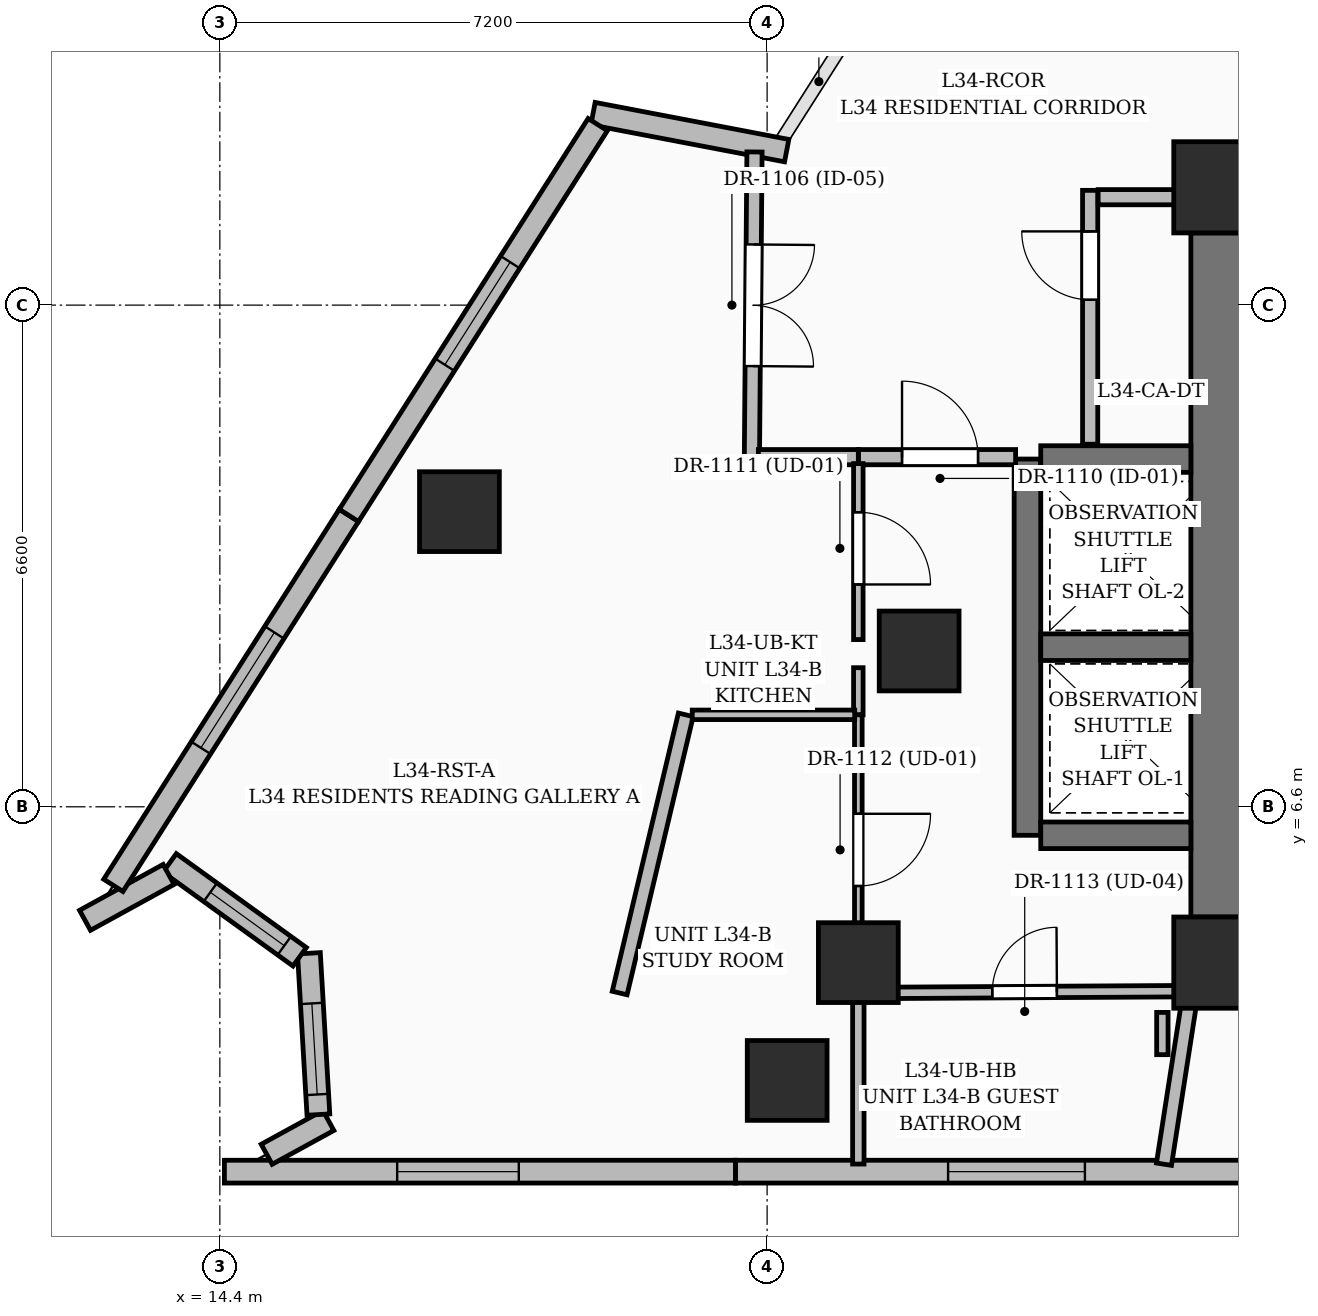
"""IFC4 building model, lengths in metres.
Left out: names, types, materials, properties, quantities, classifications, styles, units other than length and angle.
Written with IfcOpenShell. Run it as: python <this file> out.ifc"""

import sys

from ifc_helpers import new_model, si_unit, direction, frame, frame_2d, origin, origin_2d, place, context, subcontext, project, spatial, rectangle, extrude, element, fill, save


model = new_model("IFC4")
c1 = context("Model", 3, precision=1e-05, world=origin(), true_north=direction((0.0, 1.0)))
c2 = subcontext(c1, "Body", "Model", "MODEL_VIEW")
j1 = project(units=[si_unit("LENGTHUNIT", "METRE"), si_unit("PLANEANGLEUNIT", "RADIAN")], contexts=[c1])
p1 = place(None, origin())
s1 = spatial("IfcSite", under=j1, at=p1, CompositionType="ELEMENT")
p2 = place(p1, origin())
s2 = spatial("IfcBuilding", under=s1, at=p2, CompositionType="ELEMENT")
p3 = place(p2, frame((0.0, 0.0, 135.6)))
s3 = spatial("IfcBuildingStorey", under=s2, at=p3, CompositionType="ELEMENT", Elevation=135.6)
for number, where, z_axis, x_axis in (
    (1, (27.55, 4.55, 0.0), (0.0, 0.0, 1.0), (1.0, 0.0, 0.0)),
    (2, (27.55, 14.75, 0.0), (0.0, 0.0, 1.0), (1.0, 0.0, 0.0)),
):
    element("IfcColumn", number, at=place(p3, frame(where, z_axis=z_axis, x_axis=x_axis)), inside=s3, PredefinedType="COLUMN", context=c2, shape_type="SweptSolid", body=[
        extrude(rectangle(XDim=1.2, YDim=1.2, at=origin_2d()), origin(), (0.0, 0.0, 1.0), 3.6),
    ])
for number, where, z_axis, x_axis in (
    (3, (22.8, 4.55, 0.0), (0.0, 0.0, 1.0), (1.0, 0.0, 0.0)),
    (4, (23.6, 8.65, 0.0), (0.0, 0.0, 1.0), (1.0, 0.0, 0.0)),
):
    element("IfcColumn", number, at=place(p3, frame(where, z_axis=z_axis, x_axis=x_axis)), inside=s3, PredefinedType="COLUMN", context=c2, shape_type="SweptSolid", body=[
        extrude(rectangle(XDim=1.05, YDim=1.05, at=origin_2d()), origin(), (0.0, 0.0, 1.0), 3.6),
    ])
p4 = place(p3, frame((27.55, 5.15, 0.0), z_axis=(0.0, 0.0, 1.0), x_axis=(0.0, 1.0, 0.0)))
e5 = element("IfcWall", 5, at=p4, inside=s3, PredefinedType="SHEAR", context=c2, shape_type="SweptSolid", body=[
    extrude(rectangle(XDim=9.0, YDim=0.75, at=frame_2d((4.5, 0.0))), origin(), (0.0, 0.0, 1.0), 3.6),
])
p5 = place(p3, frame((25.025, 6.225, 0.0), z_axis=(0.0, 0.0, 1.0), x_axis=(0.0, 1.0, 0.0)))
e6 = element("IfcWall", 6, at=p5, inside=s3, PredefinedType="SOLIDWALL", context=c2, shape_type="SweptSolid", body=[
    extrude(rectangle(XDim=4.95, YDim=0.35, at=frame_2d((2.475, 0.0))), origin(), (0.0, 0.0, 1.0), 3.6),
])
for number, where, z_axis, x_axis in (
    (7, (25.2, 6.225, 0.0), (0.0, 0.0, 1.0), (1.0, 0.0, 0.0)),
    (8, (25.2, 8.7, 0.0), (0.0, 0.0, 1.0), (1.0, 0.0, 0.0)),
    (9, (25.2, 11.175, 0.0), (0.0, 0.0, 1.0), (1.0, 0.0, 0.0)),
):
    element("IfcWall", number, at=place(p3, frame(where, z_axis=z_axis, x_axis=x_axis)), inside=s3, PredefinedType="SOLIDWALL", context=c2, shape_type="SweptSolid", body=[
        extrude(rectangle(XDim=1.975, YDim=0.35, at=frame_2d((0.988, 0.0))), origin(), (0.0, 0.0, 1.0), 3.6),
    ])
for number, where, z_axis, x_axis in (
    (10, (21.864, 3.0, 0.0), (0.0, 0.0, 1.0), (1.0, 0.0, 0.0)),
    (11, (17.552, 10.483, 0.0), (0.0, 0.0, 1.0), (1.0, 0.0, 0.0)),
):
    element("IfcColumn", number, at=place(p3, frame(where, z_axis=z_axis, x_axis=x_axis)), inside=s3, PredefinedType="COLUMN", context=c2, shape_type="SweptSolid", body=[
        extrude(rectangle(XDim=1.05, YDim=1.05, at=origin_2d()), origin(), (0.0, 0.0, 1.0), 3.6),
    ])
p6 = place(p3, frame((19.31, 15.719, 0.0), z_axis=(0.0, 0.0, 1.0), x_axis=(0.982248657163, -0.187583516072, 0.0)))
e12 = element("IfcWall", 12, at=p6, inside=s3, PredefinedType="SOLIDWALL", context=c2, shape_type="SweptSolid", body=[
    extrude(rectangle(XDim=2.594, YDim=0.3, at=frame_2d((1.297, 0.0))), origin(), (0.0, 0.0, 1.0), 2.575),
])
p7 = place(p3, frame((27.906, 1.8, 0.0), z_axis=(0.0, 0.0, 1.0), x_axis=(-1.0, 0.0, 0.0)))
e13 = element("IfcWall", 13, at=p7, inside=s3, PredefinedType="SOLIDWALL", context=c2, shape_type="SweptSolid", body=[
    extrude(rectangle(XDim=6.723, YDim=0.3, at=frame_2d((3.361, 0.0))), origin(), (0.0, 0.0, 1.0), 3.35),
])
p8 = place(p7, frame((2.125, 0.0, 0.6)))
e14 = element("IfcOpeningElement", 14, at=p8, cuts=e13, PredefinedType="OPENING", context=c2, shape_type="SweptSolid", body=[
    extrude(rectangle(XDim=1.8, YDim=2.1, at=frame_2d((0.9, 1.05))), frame((0.0, 0.16, 0.0), z_axis=(0.0, -1.0, 0.0), x_axis=(1.0, 0.0, 0.0)), (0.0, 0.0, 1.0), 0.32),
])
p9 = place(p3, frame((21.183, 1.8, 0.0), z_axis=(0.0, 0.0, 1.0), x_axis=(-1.0, 0.0, 0.0)))
e15 = element("IfcWall", 15, at=p9, inside=s3, PredefinedType="SOLIDWALL", context=c2, shape_type="SweptSolid", body=[
    extrude(rectangle(XDim=6.723, YDim=0.3, at=frame_2d((3.362, 0.0))), origin(), (0.0, 0.0, 1.0), 3.35),
])
p10 = place(p9, frame((2.85, 0.0, 0.55)))
e16 = element("IfcOpeningElement", 16, at=p10, cuts=e15, PredefinedType="OPENING", context=c2, shape_type="SweptSolid", body=[
    extrude(rectangle(XDim=1.6, YDim=2.2, at=frame_2d((0.8, 1.1))), frame((0.0, 0.16, 0.0), z_axis=(0.0, -1.0, 0.0), x_axis=(1.0, 0.0, 0.0)), (0.0, 0.0, 1.0), 0.32),
])
p11 = place(p3, frame((15.016, 2.028, 0.0), z_axis=(0.0, 0.0, 1.0), x_axis=(0.876794471231, 0.48086531921, 0.0)))
e17 = element("IfcWall", 17, at=p11, inside=s3, PredefinedType="SOLIDWALL", context=c2, shape_type="SweptSolid", body=[
    extrude(rectangle(XDim=0.926, YDim=0.3, at=frame_2d((0.463, 0.0))), origin(), (0.0, 0.0, 1.0), 3.35),
])
p12 = place(p3, frame((15.697, 2.551, 0.0), z_axis=(0.0, 0.0, 1.0), x_axis=(-0.058688358982, 0.99827635278, 0.0)))
e18 = element("IfcWall", 18, at=p12, inside=s3, PredefinedType="SOLIDWALL", context=c2, shape_type="SweptSolid", body=[
    extrude(rectangle(XDim=2.126, YDim=0.3, at=frame_2d((1.063, 0.0))), origin(), (0.0, 0.0, 1.0), 3.35),
])
p13 = place(p12, frame((0.265, 0.0, 0.8)))
e19 = element("IfcOpeningElement", 19, at=p13, cuts=e18, PredefinedType="OPENING", context=c2, shape_type="SweptSolid", body=[
    extrude(rectangle(XDim=1.2, YDim=1.8, at=frame_2d((0.6, 0.9))), frame((0.0, 0.16, 0.0), z_axis=(0.0, -1.0, 0.0), x_axis=(1.0, 0.0, 0.0)), (0.0, 0.0, 1.0), 0.32),
])
p14 = place(p3, frame((15.45, 4.627, 0.0), z_axis=(0.0, 0.0, 1.0), x_axis=(-0.810712787228, 0.585444084969, 0.0)))
e20 = element("IfcWall", 20, at=p14, inside=s3, PredefinedType="SOLIDWALL", context=c2, shape_type="SweptSolid", body=[
    extrude(rectangle(XDim=2.11, YDim=0.3, at=frame_2d((1.055, 0.0))), origin(), (0.0, 0.0, 1.0), 3.35),
])
p15 = place(p14, frame((0.25, 0.0, 0.8)))
e21 = element("IfcOpeningElement", 21, at=p15, cuts=e20, PredefinedType="OPENING", context=c2, shape_type="SweptSolid", body=[
    extrude(rectangle(XDim=1.2, YDim=1.8, at=frame_2d((0.6, 0.9))), frame((0.0, 0.16, 0.0), z_axis=(0.0, -1.0, 0.0), x_axis=(1.0, 0.0, 0.0)), (0.0, 0.0, 1.0), 0.32),
])
p16 = place(p3, frame((13.726, 5.71, 0.0), z_axis=(0.0, 0.0, 1.0), x_axis=(-0.876642942611, -0.481141508467, 0.0)))
e22 = element("IfcWall", 22, at=p16, inside=s3, PredefinedType="SOLIDWALL", context=c2, shape_type="SweptSolid", body=[
    extrude(rectangle(XDim=1.254, YDim=0.3, at=frame_2d((0.627, 0.0))), origin(), (0.0, 0.0, 1.0), 3.35),
])
p17 = place(p3, frame((12.999, 5.566, 0.0), z_axis=(0.0, 0.0, 1.0), x_axis=(0.537080803341, 0.843530800079, 0.0)))
e23 = element("IfcWall", 23, at=p17, inside=s3, PredefinedType="SOLIDWALL", context=c2, shape_type="SweptSolid", body=[
    extrude(rectangle(XDim=5.77, YDim=0.3, at=frame_2d((2.885, 0.0))), origin(), (0.0, 0.0, 1.0), 3.35),
])
p18 = place(p17, frame((2.145, 0.0, 0.6)))
e24 = element("IfcOpeningElement", 24, at=p18, cuts=e23, PredefinedType="OPENING", context=c2, shape_type="SweptSolid", body=[
    extrude(rectangle(XDim=1.8, YDim=2.1, at=frame_2d((0.9, 1.05))), frame((0.0, 0.16, 0.0), z_axis=(0.0, -1.0, 0.0), x_axis=(1.0, 0.0, 0.0)), (0.0, 0.0, 1.0), 0.32),
])
p19 = place(p3, frame((16.098, 10.434, 0.0), z_axis=(0.0, 0.0, 1.0), x_axis=(0.537126867387, 0.843501469075, 0.0)))
e25 = element("IfcWall", 25, at=p19, inside=s3, PredefinedType="SOLIDWALL", context=c2, shape_type="SweptSolid", body=[
    extrude(rectangle(XDim=6.095, YDim=0.3, at=frame_2d((3.048, 0.0))), origin(), (0.0, 0.0, 1.0), 3.35),
])
p20 = place(p19, frame((2.35, 0.0, 0.55)))
e26 = element("IfcOpeningElement", 26, at=p20, cuts=e25, PredefinedType="OPENING", context=c2, shape_type="SweptSolid", body=[
    extrude(rectangle(XDim=1.6, YDim=2.2, at=frame_2d((0.8, 1.1))), frame((0.0, 0.16, 0.0), z_axis=(0.0, -1.0, 0.0), x_axis=(1.0, 0.0, 0.0)), (0.0, 0.0, 1.0), 0.32),
])
p21 = place(p3, frame((25.85, 11.37, 0.0), z_axis=(0.0, 0.0, 1.0), x_axis=(0.0, 1.0, 0.0)))
e27 = element("IfcWall", 27, at=p21, inside=s3, PredefinedType="PARTITIONING", context=c2, shape_type="SweptSolid", body=[
    extrude(rectangle(XDim=3.34, YDim=0.2, at=frame_2d((1.67, 0.0))), origin(), (0.0, 0.0, 1.0), 3.35),
])
p22 = place(p21, frame((1.9, 0.0, 0.0)))
e28 = element("IfcOpeningElement", 28, at=p22, cuts=e27, PredefinedType="OPENING", context=c2, shape_type="SweptSolid", body=[
    extrude(rectangle(XDim=0.9, YDim=2.1, at=frame_2d((0.45, 1.05))), frame((0.0, 0.11, 0.0), z_axis=(0.0, -1.0, 0.0), x_axis=(1.0, 0.0, 0.0)), (0.0, 0.0, 1.0), 0.22),
])
p23 = place(p3, frame((25.955, 14.62, 0.0), z_axis=(0.0, 0.0, 1.0), x_axis=(1.0, 0.0, 0.0)))
e29 = element("IfcWall", 29, at=p23, inside=s3, PredefinedType="PARTITIONING", context=c2, shape_type="SweptSolid", body=[
    extrude(rectangle(XDim=1.205, YDim=0.2, at=frame_2d((0.603, 0.0))), origin(), (0.0, 0.0, 1.0), 3.35),
])
p24 = place(p3, frame((21.434, 15.215, 0.0), z_axis=(0.0, 0.0, 1.0), x_axis=(-0.008512399832, -0.999963768868, 0.0)))
e30 = element("IfcWall", 30, at=p24, inside=s3, PredefinedType="PARTITIONING", context=c2, shape_type="SweptSolid", body=[
    extrude(rectangle(XDim=4.015, YDim=0.2, at=frame_2d((2.008, 0.0))), origin(), (0.0, 0.0, 1.0), 2.709),
])
p25 = place(p24, frame((1.217, 0.0, 0.0)))
e31 = element("IfcOpeningElement", 31, at=p25, cuts=e30, PredefinedType="OPENING", context=c2, shape_type="SweptSolid", body=[
    extrude(rectangle(XDim=1.6, YDim=2.3, at=frame_2d((0.8, 1.15))), frame((0.0, 0.11, 0.0), z_axis=(0.0, -1.0, 0.0), x_axis=(1.0, 0.0, 0.0)), (0.0, 0.0, 1.0), 0.22),
])
p26 = place(p3, frame((22.8, 11.2, 0.0), z_axis=(0.0, 0.0, 1.0), x_axis=(1.0, 0.0, 0.0)))
e32 = element("IfcWall", 32, at=p26, inside=s3, PredefinedType="PARTITIONING", context=c2, shape_type="SweptSolid", body=[
    extrude(rectangle(XDim=2.069, YDim=0.2, at=frame_2d((1.035, 0.0))), origin(), (0.0, 0.0, 1.0), 3.35),
])
p27 = place(p26, frame((0.575, 0.0, 0.0)))
e33 = element("IfcOpeningElement", 33, at=p27, cuts=e32, PredefinedType="OPENING", context=c2, shape_type="SweptSolid", body=[
    extrude(rectangle(XDim=1.0, YDim=2.2, at=frame_2d((0.5, 1.1))), frame((0.0, 0.11, 0.0), z_axis=(0.0, -1.0, 0.0), x_axis=(1.0, 0.0, 0.0)), (0.0, 0.0, 1.0), 0.22),
])
p28 = place(p3, frame((21.485, 11.2, 0.0), z_axis=(0.0, 0.0, 1.0), x_axis=(1.0, 0.0, 0.0)))
e34 = element("IfcWall", 34, at=p28, inside=s3, PredefinedType="PARTITIONING", context=c2, shape_type="SweptSolid", body=[
    extrude(rectangle(XDim=1.315, YDim=0.2, at=frame_2d((0.657, 0.0))), origin(), (0.0, 0.0, 1.0), 2.709),
])
p29 = place(p3, frame((19.66, 4.15, 0.0), z_axis=(0.0, 0.0, 1.0), x_axis=(0.231281283295, 0.972886924569, 0.0)))
e35 = element("IfcWall", 35, at=p29, inside=s3, PredefinedType="PARTITIONING", context=c2, shape_type="SweptSolid", body=[
    extrude(rectangle(XDim=3.762, YDim=0.2, at=frame_2d((1.881, 0.0))), origin(), (0.0, 0.0, 1.0), 2.57),
])
p30 = place(p3, frame((22.8, 4.15, 0.0), z_axis=(0.0, 0.0, 1.0), x_axis=(0.999983481992, 0.005747672915, 0.0)))
e36 = element("IfcWall", 36, at=p30, inside=s3, PredefinedType="PARTITIONING", context=c2, shape_type="SweptSolid", body=[
    extrude(rectangle(XDim=4.375, YDim=0.15, at=frame_2d((2.188, 0.0))), origin(), (0.0, 0.0, 1.0), 3.35),
])
p31 = place(p30, frame((1.762, 0.0, 0.0)))
e37 = element("IfcOpeningElement", 37, at=p31, cuts=e36, PredefinedType="OPENING", context=c2, shape_type="SweptSolid", body=[
    extrude(rectangle(XDim=0.85, YDim=2.1, at=frame_2d((0.425, 1.05))), frame((0.0, 0.085, 0.0), z_axis=(0.0, -1.0, 0.0), x_axis=(1.0, 0.0, 0.0)), (0.0, 0.0, 1.0), 0.17),
])
p32 = place(p3, frame((22.8, 8.43, 0.0), z_axis=(0.0, 0.0, 1.0), x_axis=(0.0, -1.0, 0.0)))
e38 = element("IfcWall", 38, at=p32, inside=s3, PredefinedType="PARTITIONING", context=c2, shape_type="SweptSolid", body=[
    extrude(rectangle(XDim=0.62, YDim=0.125, at=frame_2d((0.31, 0.0))), origin(), (0.0, 0.0, 1.0), 3.35),
])
p33 = place(p3, frame((22.8, 11.115, 0.0), z_axis=(0.0, 0.0, 1.0), x_axis=(0.0, -1.0, 0.0)))
e39 = element("IfcWall", 39, at=p33, inside=s3, PredefinedType="PARTITIONING", context=c2, shape_type="SweptSolid", body=[
    extrude(rectangle(XDim=2.315, YDim=0.125, at=frame_2d((1.157, 0.0))), origin(), (0.0, 0.0, 1.0), 2.372),
])
p34 = place(p33, frame((0.64, 0.0, 0.0)))
e40 = element("IfcOpeningElement", 40, at=p34, cuts=e39, PredefinedType="OPENING", context=c2, shape_type="SweptSolid", body=[
    extrude(rectangle(XDim=0.95, YDim=2.2, at=frame_2d((0.475, 1.1))), frame((0.0, 0.072, 0.0), z_axis=(0.0, -1.0, 0.0), x_axis=(1.0, 0.0, 0.0)), (0.0, 0.0, 1.0), 0.145),
])
p35 = place(p3, frame((22.8, 7.81, 0.0), z_axis=(0.0, 0.0, 1.0), x_axis=(0.0, -1.0, 0.0)))
e41 = element("IfcWall", 41, at=p35, inside=s3, PredefinedType="PARTITIONING", context=c2, shape_type="SweptSolid", body=[
    extrude(rectangle(XDim=3.62, YDim=0.1, at=frame_2d((1.81, 0.0))), origin(), (0.0, 0.0, 1.0), 3.35),
])
p36 = place(p35, frame((1.302, 0.0, 0.0)))
e42 = element("IfcOpeningElement", 42, at=p36, cuts=e41, PredefinedType="OPENING", context=c2, shape_type="SweptSolid", body=[
    extrude(rectangle(XDim=0.95, YDim=2.2, at=frame_2d((0.475, 1.1))), frame((0.0, 0.06, 0.0), z_axis=(0.0, -1.0, 0.0), x_axis=(1.0, 0.0, 0.0)), (0.0, 0.0, 1.0), 0.12),
])
p37 = place(p3, frame((26.821, 1.898, 0.0), z_axis=(0.0, 0.0, 1.0), x_axis=(0.153487503402, 0.988150588878, 0.0)))
e43 = element("IfcWall", 43, at=p37, inside=s3, PredefinedType="PARTITIONING", context=c2, shape_type="SweptSolid", body=[
    extrude(rectangle(XDim=2.244, YDim=0.2, at=frame_2d((1.122, 0.0))), origin(), (0.0, 0.0, 1.0), 2.57),
])
p38 = place(p3, frame((20.615, 7.81, 0.0), z_axis=(0.0, 0.0, 1.0), x_axis=(1.0, 0.0, 0.0)))
e44 = element("IfcWall", 44, at=p38, inside=s3, PredefinedType="PARTITIONING", context=c2, shape_type="SweptSolid", body=[
    extrude(rectangle(XDim=2.137, YDim=0.125, at=frame_2d((1.069, 0.0))), origin(), (0.0, 0.0, 1.0), 3.35),
])
p39 = place(p3, frame((22.8, 4.09, 0.0), z_axis=(0.0, 0.0, 1.0), x_axis=(0.0, -1.0, 0.0)))
e45 = element("IfcWall", 45, at=p39, inside=s3, PredefinedType="PARTITIONING", context=c2, shape_type="SweptSolid", body=[
    extrude(rectangle(XDim=2.19, YDim=0.15, at=frame_2d((1.095, 0.0))), origin(), (0.0, 0.0, 1.0), 2.57),
])
p40 = place(p3, frame((26.8, 3.339, 0.0), z_axis=(0.0, 0.0, 1.0), x_axis=(0.0, 1.0, 0.0)))
e46 = element("IfcWall", 46, at=p40, inside=s3, PredefinedType="PARTITIONING", context=c2, shape_type="SweptSolid", body=[
    extrude(rectangle(XDim=0.556, YDim=0.15, at=frame_2d((0.278, 0.0))), origin(), (0.0, 0.0, 1.0), 3.35),
])
p41 = place(p8, origin())
e47 = element("IfcWindow", 47, at=p41, inside=s3, PartitioningType="SINGLE_PANEL", PredefinedType="WINDOW", context=c2, shape_type="SweptSolid", body=[
    extrude(rectangle(XDim=1.8, YDim=2.1, at=frame_2d((0.9, 1.05))), frame((0.0, 0.03, 0.0), z_axis=(0.0, -1.0, 0.0), x_axis=(1.0, 0.0, 0.0)), (0.0, 0.0, 1.0), 0.06),
])
fill(e14, e47)
p42 = place(p10, origin())
e48 = element("IfcWindow", 48, at=p42, inside=s3, PartitioningType="SINGLE_PANEL", PredefinedType="WINDOW", context=c2, shape_type="SweptSolid", body=[
    extrude(rectangle(XDim=1.6, YDim=2.2, at=frame_2d((0.8, 1.1))), frame((0.0, 0.03, 0.0), z_axis=(0.0, -1.0, 0.0), x_axis=(1.0, 0.0, 0.0)), (0.0, 0.0, 1.0), 0.06),
])
fill(e16, e48)
p43 = place(p13, origin())
e49 = element("IfcWindow", 49, at=p43, inside=s3, PartitioningType="SINGLE_PANEL", PredefinedType="WINDOW", context=c2, shape_type="SweptSolid", body=[
    extrude(rectangle(XDim=1.2, YDim=1.8, at=frame_2d((0.6, 0.9))), frame((0.0, 0.03, 0.0), z_axis=(0.0, -1.0, 0.0), x_axis=(1.0, 0.0, 0.0)), (0.0, 0.0, 1.0), 0.06),
])
fill(e19, e49)
p44 = place(p15, origin())
e50 = element("IfcWindow", 50, at=p44, inside=s3, PartitioningType="SINGLE_PANEL", PredefinedType="WINDOW", context=c2, shape_type="SweptSolid", body=[
    extrude(rectangle(XDim=1.2, YDim=1.8, at=frame_2d((0.6, 0.9))), frame((0.0, 0.03, 0.0), z_axis=(0.0, -1.0, 0.0), x_axis=(1.0, 0.0, 0.0)), (0.0, 0.0, 1.0), 0.06),
])
fill(e21, e50)
p45 = place(p18, origin())
e51 = element("IfcWindow", 51, at=p45, inside=s3, PartitioningType="SINGLE_PANEL", PredefinedType="WINDOW", context=c2, shape_type="SweptSolid", body=[
    extrude(rectangle(XDim=1.8, YDim=2.1, at=frame_2d((0.9, 1.05))), frame((0.0, 0.03, 0.0), z_axis=(0.0, -1.0, 0.0), x_axis=(1.0, 0.0, 0.0)), (0.0, 0.0, 1.0), 0.06),
])
fill(e24, e51)
p46 = place(p20, origin())
e52 = element("IfcWindow", 52, at=p46, inside=s3, PartitioningType="SINGLE_PANEL", PredefinedType="WINDOW", context=c2, shape_type="SweptSolid", body=[
    extrude(rectangle(XDim=1.6, YDim=2.2, at=frame_2d((0.8, 1.1))), frame((0.0, 0.03, 0.0), z_axis=(0.0, -1.0, 0.0), x_axis=(1.0, 0.0, 0.0)), (0.0, 0.0, 1.0), 0.06),
])
fill(e26, e52)
p47 = place(p22, origin())
e53 = element("IfcDoor", 53, at=p47, inside=s3, OperationType="SINGLE_SWING_RIGHT", PredefinedType="DOOR", context=c2, shape_type="SweptSolid", body=[
    extrude(rectangle(XDim=0.9, YDim=2.1, at=frame_2d((0.45, 1.05))), frame((0.0, 0.025, 0.0), z_axis=(0.0, -1.0, 0.0), x_axis=(1.0, 0.0, 0.0)), (0.0, 0.0, 1.0), 0.05),
])
fill(e28, e53)
p48 = place(p25, origin())
e54 = element("IfcDoor", 54, at=p48, inside=s3, OperationType="DOUBLE_DOOR_SINGLE_SWING", PredefinedType="DOOR", context=c2, shape_type="SweptSolid", body=[
    extrude(rectangle(XDim=1.6, YDim=2.3, at=frame_2d((0.8, 1.15))), frame((0.0, 0.025, 0.0), z_axis=(0.0, -1.0, 0.0), x_axis=(1.0, 0.0, 0.0)), (0.0, 0.0, 1.0), 0.05),
])
fill(e31, e54)
p49 = place(p27, origin())
e55 = element("IfcDoor", 55, at=p49, inside=s3, OperationType="SINGLE_SWING_LEFT", PredefinedType="DOOR", context=c2, shape_type="SweptSolid", body=[
    extrude(rectangle(XDim=1.0, YDim=2.2, at=frame_2d((0.5, 1.1))), frame((0.0, 0.025, 0.0), z_axis=(0.0, -1.0, 0.0), x_axis=(1.0, 0.0, 0.0)), (0.0, 0.0, 1.0), 0.05),
])
fill(e33, e55)
p50 = place(p34, origin())
e56 = element("IfcDoor", 56, at=p50, inside=s3, OperationType="SINGLE_SWING_RIGHT", PredefinedType="DOOR", context=c2, shape_type="SweptSolid", body=[
    extrude(rectangle(XDim=0.95, YDim=2.2, at=frame_2d((0.475, 1.1))), frame((0.0, 0.025, 0.0), z_axis=(0.0, -1.0, 0.0), x_axis=(1.0, 0.0, 0.0)), (0.0, 0.0, 1.0), 0.05),
])
fill(e40, e56)
p51 = place(p36, origin())
e57 = element("IfcDoor", 57, at=p51, inside=s3, OperationType="SINGLE_SWING_LEFT", PredefinedType="DOOR", context=c2, shape_type="SweptSolid", body=[
    extrude(rectangle(XDim=0.95, YDim=2.2, at=frame_2d((0.475, 1.1))), frame((0.0, 0.025, 0.0), z_axis=(0.0, -1.0, 0.0), x_axis=(1.0, 0.0, 0.0)), (0.0, 0.0, 1.0), 0.05),
])
fill(e42, e57)
p52 = place(p31, origin())
e58 = element("IfcDoor", 58, at=p52, inside=s3, OperationType="SINGLE_SWING_RIGHT", PredefinedType="DOOR", context=c2, shape_type="SweptSolid", body=[
    extrude(rectangle(XDim=0.85, YDim=2.1, at=frame_2d((0.425, 1.05))), frame((0.0, 0.025, 0.0), z_axis=(0.0, -1.0, 0.0), x_axis=(1.0, 0.0, 0.0)), (0.0, 0.0, 1.0), 0.05),
])
fill(e37, e58)
save(model, sys.argv[1])
